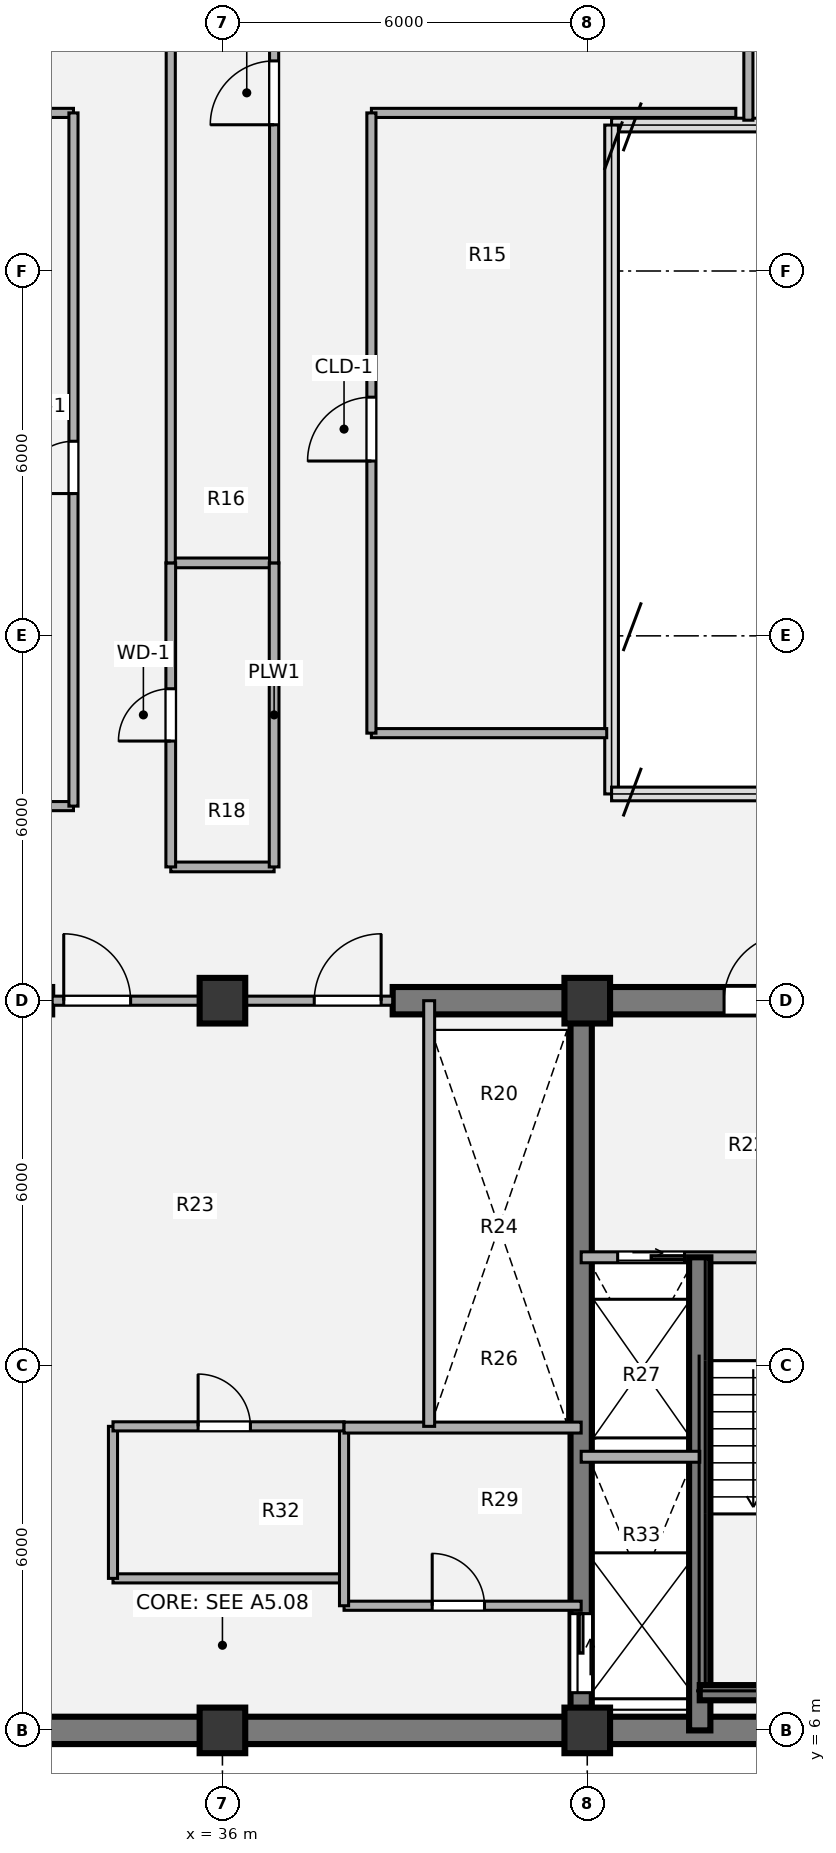
"""IFC4 building model, lengths in metres.
Left out: names, types, materials, properties, quantities, classifications, styles, units other than length and angle.
Written with IfcOpenShell. Run it as: python <this file> out.ifc"""

import sys

from ifc_helpers import new_model, si_unit, direction, frame, frame_2d, origin, origin_2d, place, context, subcontext, project, spatial, rectangle, extrude, source, transform, mapped, element, fill, save


model = new_model("IFC4")
c1 = context("Model", 3, precision=1e-05, world=origin(), true_north=direction((0.0, 1.0)))
c2 = subcontext(c1, "Body", "Model", "MODEL_VIEW")
j1 = project(units=[si_unit("LENGTHUNIT", "METRE"), si_unit("PLANEANGLEUNIT", "RADIAN")], contexts=[c1])
p1 = place(None, origin())
s1 = spatial("IfcSite", under=j1, at=p1, CompositionType="ELEMENT")
p2 = place(p1, origin())
s2 = spatial("IfcBuilding", under=s1, at=p2, CompositionType="ELEMENT")
p3 = place(p2, frame((0.0, 0.0, 182.88)))
s3 = spatial("IfcBuildingStorey", under=s2, at=p3, CompositionType="ELEMENT", Elevation=182.88)
m1 = source(origin(), c2, "Body", "SweptSolid", [
    extrude(rectangle(XDim=0.75, YDim=0.75, at=origin_2d()), origin(), (0.0, 0.0, 1.0), 3.78),
])
for number, where, z_axis, x_axis in (
    (1, (36.0, 6.0, 0.0), (0.0, 0.0, 1.0), (1.0, 0.0, 0.0)),
    (2, (42.0, 6.0, 0.0), (0.0, 0.0, 1.0), (1.0, 0.0, 0.0)),
    (3, (36.0, 18.0, 0.0), (0.0, 0.0, 1.0), (1.0, 0.0, 0.0)),
    (4, (42.0, 18.0, 0.0), (0.0, 0.0, 1.0), (1.0, 0.0, 0.0)),
):
    element("IfcColumn", number, at=place(p3, frame(where, z_axis=z_axis, x_axis=x_axis)), inside=s3, PredefinedType="COLUMN", context=c2, shape_type="MappedRepresentation", body=[
        mapped(m1, transform((0.0, 0.0, 0.0), x_axis=(1.0, 0.0, 0.0), y_axis=(0.0, 1.0, 0.0), z_axis=(0.0, 0.0, 1.0), scale=1.0)),
    ])
p4 = place(p3, frame((48.225, 6.0, 0.0), z_axis=(0.0, 0.0, 1.0), x_axis=(-1.0, 0.0, 0.0)))
e5 = element("IfcWall", 5, at=p4, inside=s3, PredefinedType="SHEAR", context=c2, shape_type="SweptSolid", body=[
    extrude(rectangle(XDim=24.45, YDim=0.45, at=frame_2d((12.225, 0.0))), origin(), (0.0, 0.0, 1.0), 3.78),
])
p5 = place(p3, frame((38.8, 18.0, 0.0), z_axis=(0.0, 0.0, 1.0), x_axis=(1.0, 0.0, 0.0)))
e6 = element("IfcWall", 6, at=p5, inside=s3, PredefinedType="SHEAR", context=c2, shape_type="SweptSolid", body=[
    extrude(rectangle(XDim=9.425, YDim=0.45, at=frame_2d((4.712, 0.0))), origin(), (0.0, 0.0, 1.0), 3.78),
])
p6 = place(p5, frame((5.45, 0.0, 0.0)))
e7 = element("IfcOpeningElement", 7, at=p6, cuts=e6, PredefinedType="OPENING", context=c2, shape_type="SweptSolid", body=[
    extrude(rectangle(XDim=1.1, YDim=2.1, at=origin_2d()), frame((0.55, 0.235, 1.05), z_axis=(0.0, -1.0, 0.0), x_axis=(1.0, 0.0, 0.0)), (0.0, 0.0, 1.0), 0.47),
])
p7 = place(p3, frame((41.9, 18.0, 0.0), z_axis=(0.0, 0.0, 1.0), x_axis=(0.0, -1.0, 0.0)))
e8 = element("IfcWall", 8, at=p7, inside=s3, PredefinedType="SHEAR", context=c2, shape_type="SweptSolid", body=[
    extrude(rectangle(XDim=12.0, YDim=0.35, at=frame_2d((6.0, 0.0))), origin(), (0.0, 0.0, 1.0), 3.78),
])
p8 = place(p7, frame((10.08, 0.0, 0.0)))
e9 = element("IfcOpeningElement", 9, at=p8, cuts=e8, PredefinedType="OPENING", context=c2, shape_type="SweptSolid", body=[
    extrude(rectangle(XDim=1.3, YDim=2.1, at=origin_2d()), frame((0.65, 0.185, 1.05), z_axis=(0.0, -1.0, 0.0), x_axis=(1.0, 0.0, 0.0)), (0.0, 0.0, 1.0), 0.37),
])
p9 = place(p3, frame((34.2, 8.5, 0.0), z_axis=(0.0, 0.0, 1.0), x_axis=(1.0, 0.0, 0.0)))
e10 = element("IfcWall", 10, at=p9, inside=s3, PredefinedType="PARTITIONING", context=c2, shape_type="SweptSolid", body=[
    extrude(rectangle(XDim=3.8, YDim=0.15, at=frame_2d((1.9, 0.0))), origin(), (0.0, 0.0, 1.0), 3.5),
])
p10 = place(p3, frame((38.0, 8.05, 0.0), z_axis=(0.0, 0.0, 1.0), x_axis=(1.0, 0.0, 0.0)))
e11 = element("IfcWall", 11, at=p10, inside=s3, PredefinedType="PARTITIONING", context=c2, shape_type="SweptSolid", body=[
    extrude(rectangle(XDim=3.9, YDim=0.15, at=frame_2d((1.95, 0.0))), origin(), (0.0, 0.0, 1.0), 3.5),
])
p11 = place(p10, frame((1.45, 0.0, 0.0)))
e12 = element("IfcOpeningElement", 12, at=p11, cuts=e11, PredefinedType="OPENING", context=c2, shape_type="SweptSolid", body=[
    extrude(rectangle(XDim=0.86, YDim=2.1, at=origin_2d()), frame((0.43, 0.085, 1.05), z_axis=(0.0, -1.0, 0.0), x_axis=(1.0, 0.0, 0.0)), (0.0, 0.0, 1.0), 0.17),
])
p12 = place(p3, frame((34.2, 8.5, 0.0), z_axis=(0.0, 0.0, 1.0), x_axis=(0.0, 1.0, 0.0)))
e13 = element("IfcWall", 13, at=p12, inside=s3, PredefinedType="PARTITIONING", context=c2, shape_type="SweptSolid", body=[
    extrude(rectangle(XDim=2.5, YDim=0.15, at=frame_2d((1.25, 0.0))), origin(), (0.0, 0.0, 1.0), 3.5),
])
p13 = place(p3, frame((38.0, 8.05, 0.0), z_axis=(0.0, 0.0, 1.0), x_axis=(0.0, 1.0, 0.0)))
e14 = element("IfcWall", 14, at=p13, inside=s3, PredefinedType="PARTITIONING", context=c2, shape_type="SweptSolid", body=[
    extrude(rectangle(XDim=2.95, YDim=0.15, at=frame_2d((1.475, 0.0))), origin(), (0.0, 0.0, 1.0), 3.5),
])
p14 = place(p3, frame((34.2, 11.0, 0.0), z_axis=(0.0, 0.0, 1.0), x_axis=(1.0, 0.0, 0.0)))
e15 = element("IfcWall", 15, at=p14, inside=s3, PredefinedType="PARTITIONING", context=c2, shape_type="SweptSolid", body=[
    extrude(rectangle(XDim=3.8, YDim=0.15, at=frame_2d((1.9, 0.0))), origin(), (0.0, 0.0, 1.0), 3.5),
])
p15 = place(p14, frame((1.4, 0.0, 0.0)))
e16 = element("IfcOpeningElement", 16, at=p15, cuts=e15, PredefinedType="OPENING", context=c2, shape_type="SweptSolid", body=[
    extrude(rectangle(XDim=0.86, YDim=2.1, at=origin_2d()), frame((0.43, 0.085, 1.05), z_axis=(0.0, -1.0, 0.0), x_axis=(1.0, 0.0, 0.0)), (0.0, 0.0, 1.0), 0.17),
])
p16 = place(p3, frame((38.0, 10.98, 0.0), z_axis=(0.0, 0.0, 1.0), x_axis=(1.0, 0.0, 0.0)))
e17 = element("IfcWall", 17, at=p16, inside=s3, PredefinedType="PARTITIONING", context=c2, shape_type="SweptSolid", body=[
    extrude(rectangle(XDim=3.9, YDim=0.18, at=frame_2d((1.95, 0.0))), origin(), (0.0, 0.0, 1.0), 3.5),
])
p17 = place(p3, frame((39.4, 11.0, 0.0), z_axis=(0.0, 0.0, 1.0), x_axis=(0.0, 1.0, 0.0)))
e18 = element("IfcWall", 18, at=p17, inside=s3, PredefinedType="PARTITIONING", context=c2, shape_type="SweptSolid", body=[
    extrude(rectangle(XDim=7.0, YDim=0.18, at=frame_2d((3.5, 0.0))), origin(), (0.0, 0.0, 1.0), 3.5),
])
p18 = place(p3, frame((33.2, 18.0, 0.0), z_axis=(0.0, 0.0, 1.0), x_axis=(1.0, 0.0, 0.0)))
e19 = element("IfcWall", 19, at=p18, inside=s3, PredefinedType="PARTITIONING", context=c2, shape_type="SweptSolid", body=[
    extrude(rectangle(XDim=5.6, YDim=0.15, at=frame_2d((2.8, 0.0))), origin(), (0.0, 0.0, 1.0), 2.515),
])
p19 = place(p18, frame((0.19, 0.0, 0.0)))
e20 = element("IfcOpeningElement", 20, at=p19, cuts=e19, PredefinedType="OPENING", context=c2, shape_type="SweptSolid", body=[
    extrude(rectangle(XDim=1.1, YDim=2.1, at=origin_2d()), frame((0.55, 0.085, 1.05), z_axis=(0.0, -1.0, 0.0), x_axis=(1.0, 0.0, 0.0)), (0.0, 0.0, 1.0), 0.17),
])
p20 = place(p18, frame((4.31, 0.0, 0.0)))
e21 = element("IfcOpeningElement", 21, at=p20, cuts=e19, PredefinedType="OPENING", context=c2, shape_type="SweptSolid", body=[
    extrude(rectangle(XDim=1.1, YDim=2.1, at=origin_2d()), frame((0.55, 0.085, 1.05), z_axis=(0.0, -1.0, 0.0), x_axis=(1.0, 0.0, 0.0)), (0.0, 0.0, 1.0), 0.17),
])
p21 = place(p3, frame((41.9, 13.78, 0.0), z_axis=(0.0, 0.0, 1.0), x_axis=(1.0, 0.0, 0.0)))
e22 = element("IfcWall", 22, at=p21, inside=s3, PredefinedType="PARTITIONING", context=c2, shape_type="SweptSolid", body=[
    extrude(rectangle(XDim=6.1, YDim=0.18, at=frame_2d((3.05, 0.0))), origin(), (0.0, 0.0, 1.0), 3.5),
])
p22 = place(p21, frame((0.6, 0.0, 0.0)))
e23 = element("IfcOpeningElement", 23, at=p22, cuts=e22, PredefinedType="OPENING", context=c2, shape_type="SweptSolid", body=[
    extrude(rectangle(XDim=1.1, YDim=2.1, at=origin_2d()), frame((0.55, 0.1, 1.05), z_axis=(0.0, -1.0, 0.0), x_axis=(1.0, 0.0, 0.0)), (0.0, 0.0, 1.0), 0.2),
])
p23 = place(p21, frame((3.8, 0.0, 0.0)))
e24 = element("IfcOpeningElement", 24, at=p23, cuts=e22, PredefinedType="OPENING", context=c2, shape_type="SweptSolid", body=[
    extrude(rectangle(XDim=1.1, YDim=2.1, at=origin_2d()), frame((0.55, 0.1, 1.05), z_axis=(0.0, -1.0, 0.0), x_axis=(1.0, 0.0, 0.0)), (0.0, 0.0, 1.0), 0.2),
])
p24 = place(p3, frame((43.85, 6.0, 0.0), z_axis=(0.0, 0.0, 1.0), x_axis=(0.0, 1.0, 0.0)))
e25 = element("IfcWall", 25, at=p24, inside=s3, PredefinedType="SHEAR", context=c2, shape_type="SweptSolid", body=[
    extrude(rectangle(XDim=7.78, YDim=0.35, at=frame_2d((3.89, 0.0))), origin(), (0.0, 0.0, 1.0), 3.85),
])
p25 = place(p3, frame((43.85, 6.62, 0.0), z_axis=(0.0, 0.0, 1.0), x_axis=(1.0, 0.0, 0.0)))
e26 = element("IfcWall", 26, at=p25, inside=s3, PredefinedType="SHEAR", context=c2, shape_type="SweptSolid", body=[
    extrude(rectangle(XDim=3.57, YDim=0.25, at=frame_2d((1.785, 0.0))), origin(), (0.0, 0.0, 1.0), 3.85),
])
p26 = place(p3, frame((41.9, 10.5, 0.0), z_axis=(0.0, 0.0, 1.0), x_axis=(1.0, 0.0, 0.0)))
e27 = element("IfcWall", 27, at=p26, inside=s3, PredefinedType="PARTITIONING", context=c2, shape_type="SweptSolid", body=[
    extrude(rectangle(XDim=1.95, YDim=0.18, at=frame_2d((0.975, 0.0))), origin(), (0.0, 0.0, 1.0), 3.5),
])
p27 = place(p3, frame((35.15, 20.2, 0.0), z_axis=(0.0, 0.0, 1.0), x_axis=(1.0, 0.0, 0.0)))
e28 = element("IfcWall", 28, at=p27, inside=s3, PredefinedType="PLUMBINGWALL", context=c2, shape_type="SweptSolid", body=[
    extrude(rectangle(XDim=1.7, YDim=0.16, at=frame_2d((0.85, 0.0))), origin(), (0.0, 0.0, 1.0), 3.5),
])
p28 = place(p3, frame((27.558, 21.2, 0.0), z_axis=(0.0, 0.0, 1.0), x_axis=(1.0, 0.0, 0.0)))
e29 = element("IfcWall", 29, at=p28, inside=s3, PredefinedType="PARTITIONING", context=c2, shape_type="SweptSolid", body=[
    extrude(rectangle(XDim=5.992, YDim=0.15, at=frame_2d((2.996, 0.0))), origin(), (0.0, 0.0, 1.0), 3.5),
])
p29 = place(p3, frame((38.45, 22.4, 0.0), z_axis=(0.0, 0.0, 1.0), x_axis=(1.0, 0.0, 0.0)))
e30 = element("IfcWall", 30, at=p29, inside=s3, PredefinedType="PARTITIONING", context=c2, shape_type="SweptSolid", body=[
    extrude(rectangle(XDim=3.87, YDim=0.15, at=frame_2d((1.935, 0.0))), origin(), (0.0, 0.0, 1.0), 3.5),
])
p30 = place(p3, frame((35.15, 25.2, 0.0), z_axis=(0.0, 0.0, 1.0), x_axis=(1.0, 0.0, 0.0)))
e31 = element("IfcWall", 31, at=p30, inside=s3, PredefinedType="PLUMBINGWALL", context=c2, shape_type="SweptSolid", body=[
    extrude(rectangle(XDim=1.7, YDim=0.16, at=frame_2d((0.85, 0.0))), origin(), (0.0, 0.0, 1.0), 3.5),
])
p31 = place(p3, frame((27.557, 32.6, 0.0), z_axis=(0.0, 0.0, 1.0), x_axis=(1.0, 0.0, 0.0)))
e32 = element("IfcWall", 32, at=p31, inside=s3, PredefinedType="PARTITIONING", context=c2, shape_type="SweptSolid", body=[
    extrude(rectangle(XDim=5.993, YDim=0.15, at=frame_2d((2.997, 0.0))), origin(), (0.0, 0.0, 1.0), 3.5),
])
p32 = place(p3, frame((38.45, 32.6, 0.0), z_axis=(0.0, 0.0, 1.0), x_axis=(1.0, 0.0, 0.0)))
e33 = element("IfcWall", 33, at=p32, inside=s3, PredefinedType="PARTITIONING", context=c2, shape_type="SweptSolid", body=[
    extrude(rectangle(XDim=5.993, YDim=0.15, at=frame_2d((2.997, 0.0))), origin(), (0.0, 0.0, 1.0), 3.5),
])
p33 = place(p3, frame((33.55, 21.2, 0.0), z_axis=(0.0, 0.0, 1.0), x_axis=(0.0, 1.0, 0.0)))
e34 = element("IfcWall", 34, at=p33, inside=s3, PredefinedType="PARTITIONING", context=c2, shape_type="SweptSolid", body=[
    extrude(rectangle(XDim=11.4, YDim=0.15, at=frame_2d((5.7, 0.0))), origin(), (0.0, 0.0, 1.0), 3.5),
])
p34 = place(p33, frame((5.14, 0.0, 0.0)))
e35 = element("IfcOpeningElement", 35, at=p34, cuts=e34, PredefinedType="OPENING", context=c2, shape_type="SweptSolid", body=[
    extrude(rectangle(XDim=0.86, YDim=2.1, at=origin_2d()), frame((0.43, 0.085, 1.05), z_axis=(0.0, -1.0, 0.0), x_axis=(1.0, 0.0, 0.0)), (0.0, 0.0, 1.0), 0.17),
])
p35 = place(p3, frame((35.15, 20.2, 0.0), z_axis=(0.0, 0.0, 1.0), x_axis=(0.0, 1.0, 0.0)))
e36 = element("IfcWall", 36, at=p35, inside=s3, PredefinedType="PLUMBINGWALL", context=c2, shape_type="SweptSolid", body=[
    extrude(rectangle(XDim=5.0, YDim=0.16, at=frame_2d((2.5, 0.0))), origin(), (0.0, 0.0, 1.0), 3.5),
])
p36 = place(p35, frame((2.07, 0.0, 0.0)))
e37 = element("IfcOpeningElement", 37, at=p36, cuts=e36, PredefinedType="OPENING", context=c2, shape_type="SweptSolid", body=[
    extrude(rectangle(XDim=0.86, YDim=2.1, at=origin_2d()), frame((0.43, 0.09, 1.05), z_axis=(0.0, -1.0, 0.0), x_axis=(1.0, 0.0, 0.0)), (0.0, 0.0, 1.0), 0.18),
])
p37 = place(p3, frame((35.15, 25.2, 0.0), z_axis=(0.0, 0.0, 1.0), x_axis=(0.0, 1.0, 0.0)))
e38 = element("IfcWall", 38, at=p37, inside=s3, PredefinedType="PARTITIONING", context=c2, shape_type="SweptSolid", body=[
    extrude(rectangle(XDim=15.46, YDim=0.15, at=frame_2d((7.73, 0.0))), origin(), (0.0, 0.0, 1.0), 3.5),
])
p38 = place(p3, frame((36.85, 20.2, 0.0), z_axis=(0.0, 0.0, 1.0), x_axis=(0.0, 1.0, 0.0)))
e39 = element("IfcWall", 39, at=p38, inside=s3, PredefinedType="PLUMBINGWALL", context=c2, shape_type="SweptSolid", body=[
    extrude(rectangle(XDim=5.0, YDim=0.16, at=frame_2d((2.5, 0.0))), origin(), (0.0, 0.0, 1.0), 3.5),
])
p39 = place(p3, frame((36.85, 25.2, 0.0), z_axis=(0.0, 0.0, 1.0), x_axis=(0.0, 1.0, 0.0)))
e40 = element("IfcWall", 40, at=p39, inside=s3, PredefinedType="PARTITIONING", context=c2, shape_type="SweptSolid", body=[
    extrude(rectangle(XDim=15.46, YDim=0.15, at=frame_2d((7.73, 0.0))), origin(), (0.0, 0.0, 1.0), 3.5),
])
p40 = place(p39, frame((7.205, 0.0, 0.0)))
e41 = element("IfcOpeningElement", 41, at=p40, cuts=e40, PredefinedType="OPENING", context=c2, shape_type="SweptSolid", body=[
    extrude(rectangle(XDim=1.05, YDim=2.1, at=origin_2d()), frame((0.525, 0.085, 1.05), z_axis=(0.0, -1.0, 0.0), x_axis=(1.0, 0.0, 0.0)), (0.0, 0.0, 1.0), 0.17),
])
p41 = place(p3, frame((38.45, 22.4, 0.0), z_axis=(0.0, 0.0, 1.0), x_axis=(0.0, 1.0, 0.0)))
e42 = element("IfcWall", 42, at=p41, inside=s3, PredefinedType="PARTITIONING", context=c2, shape_type="SweptSolid", body=[
    extrude(rectangle(XDim=10.2, YDim=0.15, at=frame_2d((5.1, 0.0))), origin(), (0.0, 0.0, 1.0), 3.5),
])
p42 = place(p41, frame((4.475, 0.0, 0.0)))
e43 = element("IfcOpeningElement", 43, at=p42, cuts=e42, PredefinedType="OPENING", context=c2, shape_type="SweptSolid", body=[
    extrude(rectangle(XDim=1.05, YDim=2.1, at=origin_2d()), frame((0.525, 0.085, 1.05), z_axis=(0.0, -1.0, 0.0), x_axis=(1.0, 0.0, 0.0)), (0.0, 0.0, 1.0), 0.17),
])
p43 = place(p3, frame((44.65, 32.48, 0.0), z_axis=(0.0, 0.0, 1.0), x_axis=(0.0, 1.0, 0.0)))
e44 = element("IfcWall", 44, at=p43, inside=s3, PredefinedType="PARTITIONING", context=c2, shape_type="SweptSolid", body=[
    extrude(rectangle(XDim=3.921, YDim=0.15, at=frame_2d((1.96, 0.0))), origin(), (0.0, 0.0, 1.0), 3.5),
])
p44 = place(p43, frame((1.56, 0.0, 0.0)))
e45 = element("IfcOpeningElement", 45, at=p44, cuts=e44, PredefinedType="OPENING", context=c2, shape_type="SweptSolid", body=[
    extrude(rectangle(XDim=0.86, YDim=2.1, at=origin_2d()), frame((0.43, 0.085, 1.05), z_axis=(0.0, -1.0, 0.0), x_axis=(1.0, 0.0, 0.0)), (0.0, 0.0, 1.0), 0.17),
])
m2 = source(origin(), c2, "Body", "SweptSolid", [
    extrude(rectangle(XDim=0.86, YDim=2.1, at=origin_2d()), frame((0.43, 0.025, 1.05), z_axis=(0.0, -1.0, 0.0), x_axis=(1.0, 0.0, 0.0)), (0.0, 0.0, 1.0), 0.05),
])
p45 = place(p11, origin())
e46 = element("IfcDoor", 46, at=p45, inside=s3, OperationType="SINGLE_SWING_LEFT", PredefinedType="DOOR", context=c2, shape_type="MappedRepresentation", body=[
    mapped(m2, transform((0.0, 0.0, 0.0), x_axis=(1.0, 0.0, 0.0), y_axis=(0.0, 1.0, 0.0), z_axis=(0.0, 0.0, 1.0), scale=1.0)),
])
fill(e12, e46)
p46 = place(p15, origin())
e47 = element("IfcDoor", 47, at=p46, inside=s3, OperationType="SINGLE_SWING_LEFT", PredefinedType="DOOR", context=c2, shape_type="MappedRepresentation", body=[
    mapped(m2, transform((0.0, 0.0, 0.0), x_axis=(1.0, 0.0, 0.0), y_axis=(0.0, 1.0, 0.0), z_axis=(0.0, 0.0, 1.0), scale=1.0)),
])
fill(e16, e47)
m3 = source(origin(), c2, "Body", "SweptSolid", [
    extrude(rectangle(XDim=1.1, YDim=2.1, at=origin_2d()), frame((0.55, 0.025, 1.05), z_axis=(0.0, -1.0, 0.0), x_axis=(1.0, 0.0, 0.0)), (0.0, 0.0, 1.0), 0.05),
])
p47 = place(p19, origin())
e48 = element("IfcDoor", 48, at=p47, inside=s3, OperationType="SINGLE_SWING_LEFT", PredefinedType="DOOR", context=c2, shape_type="MappedRepresentation", body=[
    mapped(m3, transform((0.0, 0.0, 0.0), x_axis=(1.0, 0.0, 0.0), y_axis=(0.0, 1.0, 0.0), z_axis=(0.0, 0.0, 1.0), scale=1.0)),
])
fill(e20, e48)
p48 = place(p20, origin())
e49 = element("IfcDoor", 49, at=p48, inside=s3, OperationType="SINGLE_SWING_RIGHT", PredefinedType="DOOR", context=c2, shape_type="MappedRepresentation", body=[
    mapped(m3, transform((0.0, 0.0, 0.0), x_axis=(1.0, 0.0, 0.0), y_axis=(0.0, 1.0, 0.0), z_axis=(0.0, 0.0, 1.0), scale=1.0)),
])
fill(e21, e49)
m4 = source(origin(), c2, "Body", "SweptSolid", [
    extrude(rectangle(XDim=1.1, YDim=2.1, at=origin_2d()), frame((0.55, 0.025, 1.05), z_axis=(0.0, -1.0, 0.0), x_axis=(1.0, 0.0, 0.0)), (0.0, 0.0, 1.0), 0.05),
])
p49 = place(p22, origin())
e50 = element("IfcDoor", 50, at=p49, inside=s3, OperationType="SLIDING_TO_RIGHT", PredefinedType="DOOR", context=c2, shape_type="MappedRepresentation", body=[
    mapped(m4, transform((0.0, 0.0, 0.0), x_axis=(1.0, 0.0, 0.0), y_axis=(0.0, 1.0, 0.0), z_axis=(0.0, 0.0, 1.0), scale=1.0)),
])
fill(e23, e50)
m5 = source(origin(), c2, "Body", "SweptSolid", [
    extrude(rectangle(XDim=1.3, YDim=2.1, at=origin_2d()), frame((0.65, 0.025, 1.05), z_axis=(0.0, -1.0, 0.0), x_axis=(1.0, 0.0, 0.0)), (0.0, 0.0, 1.0), 0.05),
])
p50 = place(p8, origin())
e51 = element("IfcDoor", 51, at=p50, inside=s3, OperationType="SLIDING_TO_LEFT", PredefinedType="DOOR", context=c2, shape_type="MappedRepresentation", body=[
    mapped(m5, transform((0.0, 0.0, 0.0), x_axis=(1.0, 0.0, 0.0), y_axis=(0.0, 1.0, 0.0), z_axis=(0.0, 0.0, 1.0), scale=1.0)),
])
fill(e9, e51)
p51 = place(p6, origin())
e52 = element("IfcDoor", 52, at=p51, inside=s3, OperationType="SINGLE_SWING_RIGHT", PredefinedType="DOOR", context=c2, shape_type="MappedRepresentation", body=[
    mapped(m3, transform((0.0, 0.0, 0.0), x_axis=(1.0, 0.0, 0.0), y_axis=(0.0, 1.0, 0.0), z_axis=(0.0, 0.0, 1.0), scale=1.0)),
])
fill(e7, e52)
p52 = place(p34, origin())
e53 = element("IfcDoor", 53, at=p52, inside=s3, OperationType="SINGLE_SWING_LEFT", PredefinedType="DOOR", context=c2, shape_type="MappedRepresentation", body=[
    mapped(m2, transform((0.0, 0.0, 0.0), x_axis=(1.0, 0.0, 0.0), y_axis=(0.0, 1.0, 0.0), z_axis=(0.0, 0.0, 1.0), scale=1.0)),
])
fill(e35, e53)
m6 = source(origin(), c2, "Body", "SweptSolid", [
    extrude(rectangle(XDim=0.86, YDim=2.1, at=origin_2d()), frame((0.43, 0.025, 1.05), z_axis=(0.0, -1.0, 0.0), x_axis=(1.0, 0.0, 0.0)), (0.0, 0.0, 1.0), 0.05),
])
p53 = place(p36, origin())
e54 = element("IfcDoor", 54, at=p53, inside=s3, OperationType="SINGLE_SWING_LEFT", PredefinedType="DOOR", context=c2, shape_type="MappedRepresentation", body=[
    mapped(m6, transform((0.0, 0.0, 0.0), x_axis=(1.0, 0.0, 0.0), y_axis=(0.0, 1.0, 0.0), z_axis=(0.0, 0.0, 1.0), scale=1.0)),
])
fill(e37, e54)
m7 = source(origin(), c2, "Body", "SweptSolid", [
    extrude(rectangle(XDim=1.05, YDim=2.1, at=origin_2d()), frame((0.525, 0.025, 1.05), z_axis=(0.0, -1.0, 0.0), x_axis=(1.0, 0.0, 0.0)), (0.0, 0.0, 1.0), 0.05),
])
p54 = place(p40, origin())
e55 = element("IfcDoor", 55, at=p54, inside=s3, OperationType="SINGLE_SWING_LEFT", PredefinedType="DOOR", context=c2, shape_type="MappedRepresentation", body=[
    mapped(m7, transform((0.0, 0.0, 0.0), x_axis=(1.0, 0.0, 0.0), y_axis=(0.0, 1.0, 0.0), z_axis=(0.0, 0.0, 1.0), scale=1.0)),
])
fill(e41, e55)
p55 = place(p42, origin())
e56 = element("IfcDoor", 56, at=p55, inside=s3, OperationType="SINGLE_SWING_LEFT", PredefinedType="DOOR", context=c2, shape_type="MappedRepresentation", body=[
    mapped(m7, transform((0.0, 0.0, 0.0), x_axis=(1.0, 0.0, 0.0), y_axis=(0.0, 1.0, 0.0), z_axis=(0.0, 0.0, 1.0), scale=1.0)),
])
fill(e43, e56)
save(model, sys.argv[1])
